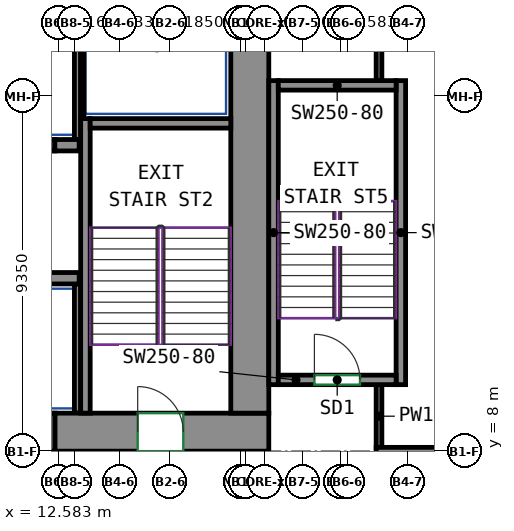
"""IFC4 building model, lengths in metres.
Left out: names, types, materials, properties, quantities, classifications, styles, units other than length and angle.
Written with IfcOpenShell. Run it as: python <this file> out.ifc"""

import sys

from ifc_helpers import new_model, si_unit, direction, frame, frame_2d, origin, place, context, subcontext, project, spatial, rectangle, extrude, source, transform, mapped, element, fill, save


model = new_model("IFC4")
c1 = context("Model", 3, precision=1e-05, world=origin(), true_north=direction((0.0, 1.0)))
c2 = subcontext(c1, "Body", "Model", "MODEL_VIEW")
j1 = project(units=[si_unit("LENGTHUNIT", "METRE"), si_unit("PLANEANGLEUNIT", "RADIAN")], contexts=[c1])
p1 = place(None, origin())
s1 = spatial("IfcSite", under=j1, at=p1, CompositionType="ELEMENT")
p2 = place(p1, origin())
s2 = spatial("IfcBuilding", under=s1, at=p2, CompositionType="ELEMENT")
p3 = place(p2, frame((0.0, 0.0, 35.0)))
s3 = spatial("IfcBuildingStorey", under=s2, at=p3, CompositionType="ELEMENT", Elevation=35.0)
m1 = source(origin(), c2, "Body", "SweptSolid", [
    extrude(rectangle(XDim=5.63, YDim=1.0, at=frame_2d((2.815, 0.0))), origin(), (0.0, 0.0, 1.0), 3.72),
])
p4 = place(p3, frame((12.47, 8.5, 0.0), z_axis=(0.0, 0.0, 1.0), x_axis=(1.0, 0.0, 0.0)))
e1 = element("IfcWall", 1, at=p4, inside=s3, PredefinedType="SHEAR", context=c2, shape_type="MappedRepresentation", body=[
    mapped(m1, transform((0.0, 0.0, 0.0))),
])
p5 = place(p4, frame((2.18, 0.0, 0.0)))
e2 = element("IfcOpeningElement", 2, at=p5, cuts=e1, PredefinedType="OPENING", context=c2, shape_type="SweptSolid", body=[
    extrude(rectangle(XDim=1.2, YDim=2.1, at=frame_2d((0.6, 1.05))), frame((0.0, 0.51, 0.0), z_axis=(0.0, -1.0, 0.0), x_axis=(1.0, 0.0, 0.0)), (0.0, 0.0, 1.0), 1.02),
])
m2 = source(origin(), c2, "Body", "SweptSolid", [
    extrude(rectangle(XDim=12.0, YDim=1.0, at=frame_2d((6.0, 0.0))), origin(), (0.0, 0.0, 1.0), 3.72),
])
p6 = place(p3, frame((17.6, 9.0, 0.0), z_axis=(0.0, 0.0, 1.0), x_axis=(0.0, 1.0, 0.0)))
e3 = element("IfcWall", 3, at=p6, inside=s3, PredefinedType="SHEAR", context=c2, shape_type="MappedRepresentation", body=[
    mapped(m2, transform((0.0, 0.0, 0.0))),
])
m3 = source(origin(), c2, "Body", "SweptSolid", [
    extrude(rectangle(XDim=7.75, YDim=0.25, at=frame_2d((3.875, 0.0))), origin(), (0.0, 0.0, 1.0), 3.72),
])
p7 = place(p3, frame((13.275, 9.0, 0.0), z_axis=(0.0, 0.0, 1.0), x_axis=(0.0, 1.0, 0.0)))
e4 = element("IfcWall", 4, at=p7, inside=s3, PredefinedType="SHEAR", context=c2, shape_type="MappedRepresentation", body=[
    mapped(m3, transform((0.0, 0.0, 0.0))),
])
m4 = source(origin(), c2, "Body", "SweptSolid", [
    extrude(rectangle(XDim=3.7, YDim=0.25, at=frame_2d((1.85, 0.0))), origin(), (0.0, 0.0, 1.0), 3.72),
])
p8 = place(p3, frame((13.4, 16.625, 0.0), z_axis=(0.0, 0.0, 1.0), x_axis=(1.0, 0.0, 0.0)))
e5 = element("IfcWall", 5, at=p8, inside=s3, PredefinedType="SHEAR", context=c2, shape_type="MappedRepresentation", body=[
    mapped(m4, transform((0.0, 0.0, 0.0))),
])
m5 = source(origin(), c2, "Body", "SweptSolid", [
    extrude(rectangle(XDim=8.0, YDim=0.25, at=frame_2d((4.0, 0.0))), origin(), (0.0, 0.0, 1.0), 3.72),
])
for number, where, z_axis, x_axis in (
    (6, (18.225, 9.75, 0.0), (0.0, 0.0, 1.0), (0.0, 1.0, 0.0)),
    (7, (21.575, 9.75, 0.0), (0.0, 0.0, 1.0), (0.0, 1.0, 0.0)),
):
    element("IfcWall", number, at=place(p3, frame(where, z_axis=z_axis, x_axis=x_axis)), inside=s3, PredefinedType="SHEAR", context=c2, shape_type="MappedRepresentation", body=[
        mapped(m5, transform((0.0, 0.0, 0.0))),
    ])
m6 = source(origin(), c2, "Body", "SweptSolid", [
    extrude(rectangle(XDim=3.1, YDim=0.25, at=frame_2d((1.55, 0.0))), origin(), (0.0, 0.0, 1.0), 3.72),
])
p9 = place(p3, frame((18.35, 9.875, 0.0), z_axis=(0.0, 0.0, 1.0), x_axis=(1.0, 0.0, 0.0)))
e8 = element("IfcWall", 8, at=p9, inside=s3, PredefinedType="SHEAR", context=c2, shape_type="MappedRepresentation", body=[
    mapped(m6, transform((0.0, 0.0, 0.0))),
])
p10 = place(p9, frame((0.95, 0.0, 0.0)))
e9 = element("IfcOpeningElement", 9, at=p10, cuts=e8, PredefinedType="OPENING", context=c2, shape_type="SweptSolid", body=[
    extrude(rectangle(XDim=1.2, YDim=2.1, at=frame_2d((0.6, 1.05))), frame((0.0, 0.135, 0.0), z_axis=(0.0, -1.0, 0.0), x_axis=(1.0, 0.0, 0.0)), (0.0, 0.0, 1.0), 0.27),
])
p11 = place(p3, frame((18.35, 17.625, 0.0), z_axis=(0.0, 0.0, 1.0), x_axis=(1.0, 0.0, 0.0)))
e10 = element("IfcWall", 10, at=p11, inside=s3, PredefinedType="SHEAR", context=c2, shape_type="MappedRepresentation", body=[
    mapped(m6, transform((0.0, 0.0, 0.0))),
])
m7 = source(origin(), c2, "Body", "SweptSolid", [
    extrude(rectangle(XDim=2.82, YDim=0.3, at=frame_2d((1.41, 0.0))), origin(), (0.0, 0.0, 1.0), 3.72),
])
p12 = place(p3, frame((10.29, 12.55, 0.0), z_axis=(0.0, 0.0, 1.0), x_axis=(1.0, 0.0, 0.0)))
e11 = element("IfcWall", 11, at=p12, inside=s3, PredefinedType="SHEAR", context=c2, shape_type="MappedRepresentation", body=[
    mapped(m7, transform((0.0, 0.0, 0.0))),
])
m8 = source(origin(), c2, "Body", "SweptSolid", [
    extrude(rectangle(XDim=0.64, YDim=0.3, at=frame_2d((0.32, 0.0))), origin(), (0.0, 0.0, 1.0), 3.72),
])
p13 = place(p3, frame((12.47, 16.05, 0.0), z_axis=(0.0, 0.0, 1.0), x_axis=(1.0, 0.0, 0.0)))
e12 = element("IfcWall", 12, at=p13, inside=s3, PredefinedType="SHEAR", context=c2, shape_type="MappedRepresentation", body=[
    mapped(m8, transform((0.0, 0.0, 0.0))),
])
m9 = source(origin(), c2, "Body", "SweptSolid", [
    extrude(rectangle(XDim=1.4, YDim=0.3, at=frame_2d((0.7, 0.0))), origin(), (0.0, 0.0, 1.0), 3.72),
])
p14 = place(p3, frame((11.07, 16.05, 0.0), z_axis=(0.0, 0.0, 1.0), x_axis=(1.0, 0.0, 0.0)))
e13 = element("IfcWall", 13, at=p14, inside=s3, PredefinedType="PARTITIONING", context=c2, shape_type="MappedRepresentation", body=[
    mapped(m9, transform((0.0, 0.0, 0.0))),
])
p15 = place(p14, frame((0.15, 0.0, 0.0)))
e14 = element("IfcOpeningElement", 14, at=p15, cuts=e13, PredefinedType="OPENING", context=c2, shape_type="SweptSolid", body=[
    extrude(rectangle(XDim=1.1, YDim=2.1, at=frame_2d((0.55, 1.05))), frame((0.0, 0.16, 0.0), z_axis=(0.0, -1.0, 0.0), x_axis=(1.0, 0.0, 0.0)), (0.0, 0.0, 1.0), 0.32),
])
m10 = source(origin(), c2, "Body", "SweptSolid", [
    extrude(rectangle(XDim=3.275, YDim=0.165, at=frame_2d((1.638, 0.0))), origin(), (0.0, 0.0, 1.0), 3.72),
])
p16 = place(p3, frame((13.067, 16.2, 0.0), z_axis=(0.0, 0.0, 1.0), x_axis=(0.0, 1.0, 0.0)))
e15 = element("IfcWall", 15, at=p16, inside=s3, PredefinedType="PARTITIONING", context=c2, shape_type="MappedRepresentation", body=[
    mapped(m10, transform((0.0, 0.0, 0.0))),
])
m11 = source(origin(), c2, "Body", "SweptSolid", [
    extrude(rectangle(XDim=2.725, YDim=0.085, at=frame_2d((1.363, 0.0))), origin(), (0.0, 0.0, 1.0), 3.72),
])
p17 = place(p3, frame((13.192, 16.75, 0.0), z_axis=(0.0, 0.0, 1.0), x_axis=(0.0, 1.0, 0.0)))
e16 = element("IfcWall", 16, at=p17, inside=s3, PredefinedType="PARTITIONING", context=c2, shape_type="MappedRepresentation", body=[
    mapped(m11, transform((0.0, 0.0, 0.0))),
])
m12 = source(origin(), c2, "Body", "SweptSolid", [
    extrude(rectangle(XDim=3.4, YDim=0.165, at=frame_2d((1.7, 0.0))), origin(), (0.0, 0.0, 1.0), 3.72),
])
p18 = place(p3, frame((13.067, 9.0, 0.0), z_axis=(0.0, 0.0, 1.0), x_axis=(0.0, 1.0, 0.0)))
e17 = element("IfcWall", 17, at=p18, inside=s3, PredefinedType="PARTITIONING", context=c2, shape_type="MappedRepresentation", body=[
    mapped(m12, transform((0.0, 0.0, 0.0))),
])
m13 = source(origin(), c2, "Body", "SweptSolid", [
    extrude(rectangle(XDim=1.4, YDim=1.0, at=frame_2d((0.7, 0.0))), origin(), (0.0, 0.0, 1.0), 2.7),
])
p19 = place(p3, frame((11.07, 8.5, 0.0), z_axis=(0.0, 0.0, 1.0), x_axis=(1.0, 0.0, 0.0)))
e18 = element("IfcWall", 18, at=p19, inside=s3, PredefinedType="PARTITIONING", context=c2, shape_type="MappedRepresentation", body=[
    mapped(m13, transform((0.0, 0.0, 0.0))),
])
p20 = place(p19, frame((0.25, 0.0, 0.0)))
e19 = element("IfcOpeningElement", 19, at=p20, cuts=e18, PredefinedType="OPENING", context=c2, shape_type="SweptSolid", body=[
    extrude(rectangle(XDim=0.9, YDim=2.1, at=frame_2d((0.45, 1.05))), frame((0.0, 0.51, 0.0), z_axis=(0.0, -1.0, 0.0), x_axis=(1.0, 0.0, 0.0)), (0.0, 0.0, 1.0), 1.02),
])
p21 = place(p3, frame((21.0, 17.75, 0.0), z_axis=(0.0, 0.0, 1.0), x_axis=(0.0, 1.0, 0.0)))
e20 = element("IfcWall", 20, at=p21, inside=s3, PredefinedType="PARTITIONING", context=c2, shape_type="SweptSolid", body=[
    extrude(rectangle(XDim=6.675, YDim=0.15, at=frame_2d((3.337, 0.0))), origin(), (0.0, 0.0, 1.0), 3.72),
])
p22 = place(p3, frame((21.0, 8.09, 0.0), z_axis=(0.0, 0.0, 1.0), x_axis=(0.0, 1.0, 0.0)))
e21 = element("IfcWall", 21, at=p22, inside=s3, PredefinedType="PARTITIONING", context=c2, shape_type="SweptSolid", body=[
    extrude(rectangle(XDim=1.66, YDim=0.15, at=frame_2d((0.83, 0.0))), origin(), (0.0, 0.0, 1.0), 3.72),
])
p23 = place(p3, frame((20.926, 8.0, 0.0), z_axis=(0.0, 0.0, 1.0), x_axis=(1.0, 0.0, 0.0)))
e22 = element("IfcWall", 22, at=p23, inside=s3, PredefinedType="PARTITIONING", context=c2, shape_type="SweptSolid", body=[
    extrude(rectangle(XDim=6.174, YDim=0.2, at=frame_2d((3.087, 0.0))), origin(), (0.0, 0.0, 1.0), 3.72),
])
p24 = place(p5, origin())
e23 = element("IfcDoor", 23, at=p24, inside=s3, OperationType="DOUBLE_DOOR_SINGLE_SWING", PredefinedType="DOOR", context=c2, shape_type="SweptSolid", body=[
    extrude(rectangle(XDim=1.2, YDim=2.1, at=frame_2d((0.6, 1.05))), frame((0.0, 0.405, 0.0), z_axis=(0.0, -1.0, 0.0), x_axis=(1.0, 0.0, 0.0)), (0.0, 0.0, 1.0), 0.05),
])
fill(e2, e23)
p25 = place(p10, origin())
e24 = element("IfcDoor", 24, at=p25, inside=s3, OperationType="DOUBLE_DOOR_SINGLE_SWING", PredefinedType="DOOR", context=c2, shape_type="SweptSolid", body=[
    extrude(rectangle(XDim=1.2, YDim=2.1, at=frame_2d((0.6, 1.05))), frame((0.0, 0.025, 0.0), z_axis=(0.0, -1.0, 0.0), x_axis=(1.0, 0.0, 0.0)), (0.0, 0.0, 1.0), 0.05),
])
fill(e9, e24)
save(model, sys.argv[1])
